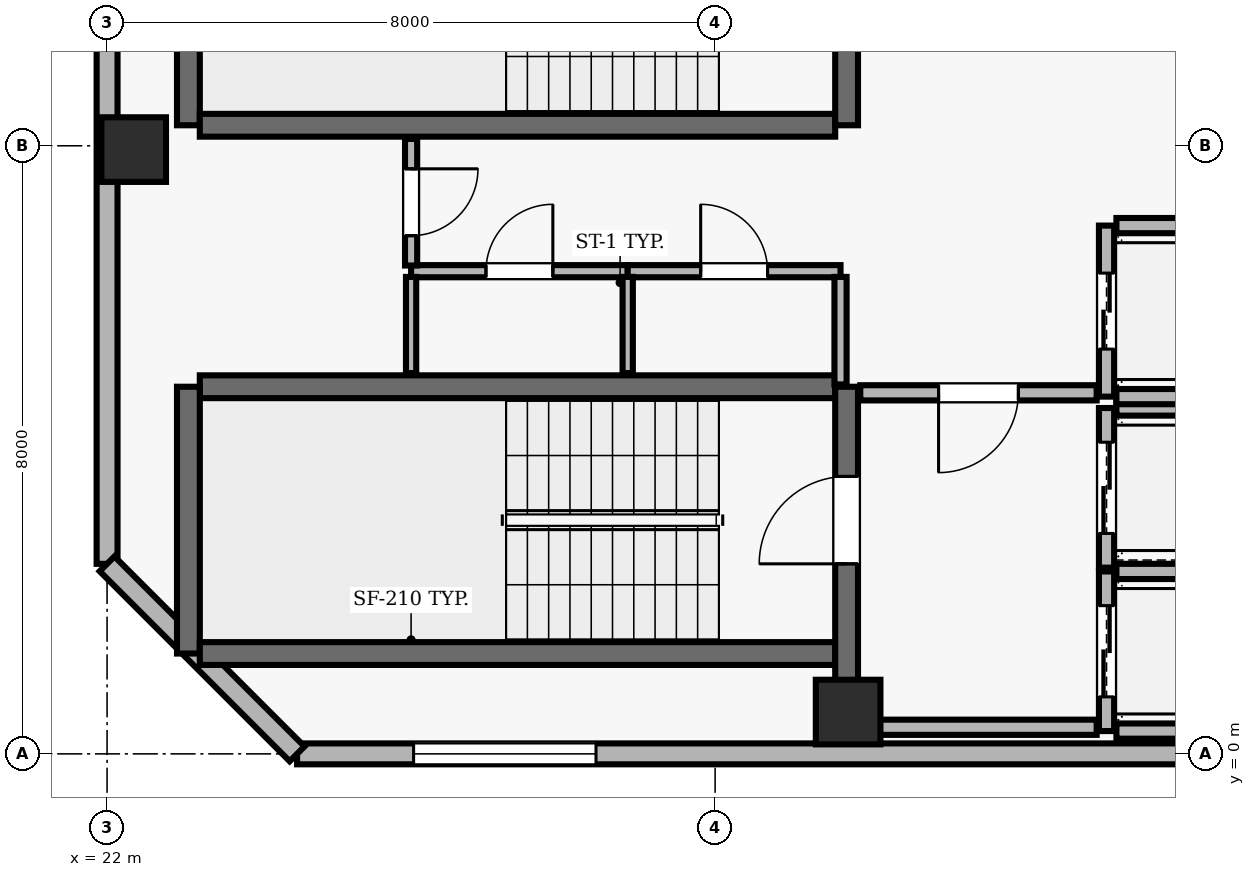
"""IFC4 building model, lengths in metres.
Left out: names, types, materials, properties, quantities, classifications, styles, units other than length and angle.
Written with IfcOpenShell. Run it as: python <this file> out.ifc"""

import sys

from ifc_helpers import new_model, si_unit, direction, frame, frame_2d, origin, origin_2d, place, context, subcontext, project, spatial, rectangle, extrude, element, fill, save


model = new_model("IFC4")
c1 = context("Model", 3, precision=1e-05, world=origin(), true_north=direction((0.0, 1.0)))
c2 = subcontext(c1, "Body", "Model", "MODEL_VIEW")
j1 = project(units=[si_unit("LENGTHUNIT", "METRE"), si_unit("PLANEANGLEUNIT", "RADIAN")], contexts=[c1])
p1 = place(None, origin())
s1 = spatial("IfcSite", under=j1, at=p1, CompositionType="ELEMENT")
p2 = place(p1, origin())
s2 = spatial("IfcBuilding", under=s1, at=p2, CompositionType="ELEMENT")
p3 = place(p2, frame((0.0, 0.0, 275.5)))
s3 = spatial("IfcBuildingStorey", under=s2, at=p3, CompositionType="ELEMENT", Elevation=275.5)
for number, where, z_axis, x_axis in (
    (1, (31.75, 0.55, 0.0), (0.0, 0.0, 1.0), (1.0, 0.0, 0.0)),
    (2, (22.35, 7.95, 0.0), (0.0, 0.0, 1.0), (1.0, 0.0, 0.0)),
):
    element("IfcColumn", number, at=place(p3, frame(where, z_axis=z_axis, x_axis=x_axis)), inside=s3, PredefinedType="COLUMN", context=c2, shape_type="SweptSolid", body=[
        extrude(rectangle(XDim=0.85, YDim=0.85, at=origin_2d()), origin(), (0.0, 0.0, 1.0), 3.9),
    ])
p4 = place(p3, frame((24.5, 0.0, 0.0), z_axis=(0.0, 0.0, 1.0), x_axis=(1.0, 0.0, 0.0)))
e3 = element("IfcWall", 3, at=p4, inside=s3, PredefinedType="SOLIDWALL", context=c2, shape_type="SweptSolid", body=[
    extrude(rectangle(XDim=32.8, YDim=0.275, at=frame_2d((16.4, 0.0))), origin(), (0.0, 0.0, 1.0), 3.69),
])
p5 = place(p4, frame((1.533, 0.0, 0.9)))
e4 = element("IfcOpeningElement", 4, at=p5, cuts=e3, PredefinedType="OPENING", context=c2, shape_type="SweptSolid", body=[
    extrude(rectangle(XDim=2.4, YDim=1.8, at=frame_2d((1.2, 0.9))), frame((0.0, 0.147, 0.0), z_axis=(0.0, -1.0, 0.0), x_axis=(1.0, 0.0, 0.0)), (0.0, 0.0, 1.0), 0.295),
])
p6 = place(p4, frame((23.85, 0.0, 0.9)))
e5 = element("IfcOpeningElement", 5, at=p6, cuts=e3, PredefinedType="OPENING", context=c2, shape_type="SweptSolid", body=[
    extrude(rectangle(XDim=2.4, YDim=1.8, at=frame_2d((1.2, 0.9))), frame((0.0, 0.147, 0.0), z_axis=(0.0, -1.0, 0.0), x_axis=(1.0, 0.0, 0.0)), (0.0, 0.0, 1.0), 0.295),
])
p7 = place(p4, frame((28.417, 0.0, 0.9)))
e6 = element("IfcOpeningElement", 6, at=p7, cuts=e3, PredefinedType="OPENING", context=c2, shape_type="SweptSolid", body=[
    extrude(rectangle(XDim=2.4, YDim=1.8, at=frame_2d((1.2, 0.9))), frame((0.0, 0.147, 0.0), z_axis=(0.0, -1.0, 0.0), x_axis=(1.0, 0.0, 0.0)), (0.0, 0.0, 1.0), 0.295),
])
p8 = place(p3, frame((22.0, 35.3, 0.0), z_axis=(0.0, 0.0, 1.0), x_axis=(0.0, -1.0, 0.0)))
e7 = element("IfcWall", 7, at=p8, inside=s3, PredefinedType="SOLIDWALL", context=c2, shape_type="SweptSolid", body=[
    extrude(rectangle(XDim=32.8, YDim=0.275, at=frame_2d((16.4, 0.0))), origin(), (0.0, 0.0, 1.0), 3.69),
])
p9 = place(p8, frame((7.3, 0.0, 0.0)))
e8 = element("IfcOpeningElement", 8, at=p9, cuts=e7, PredefinedType="OPENING", context=c2, shape_type="SweptSolid", body=[
    extrude(rectangle(XDim=1.0, YDim=2.2, at=frame_2d((0.5, 1.1))), frame((0.0, 0.147, 0.0), z_axis=(0.0, -1.0, 0.0), x_axis=(1.0, 0.0, 0.0)), (0.0, 0.0, 1.0), 0.295),
])
p10 = place(p8, frame((0.633, 0.0, 0.9)))
e9 = element("IfcOpeningElement", 9, at=p10, cuts=e7, PredefinedType="OPENING", context=c2, shape_type="SweptSolid", body=[
    extrude(rectangle(XDim=2.4, YDim=1.8, at=frame_2d((1.2, 0.9))), frame((0.0, 0.147, 0.0), z_axis=(0.0, -1.0, 0.0), x_axis=(1.0, 0.0, 0.0)), (0.0, 0.0, 1.0), 0.295),
])
p11 = place(p8, frame((12.917, 0.0, 0.9)))
e10 = element("IfcOpeningElement", 10, at=p11, cuts=e7, PredefinedType="OPENING", context=c2, shape_type="SweptSolid", body=[
    extrude(rectangle(XDim=2.4, YDim=1.8, at=frame_2d((1.2, 0.9))), frame((0.0, 0.147, 0.0), z_axis=(0.0, -1.0, 0.0), x_axis=(1.0, 0.0, 0.0)), (0.0, 0.0, 1.0), 0.295),
])
p12 = place(p8, frame((17.483, 0.0, 0.9)))
e11 = element("IfcOpeningElement", 11, at=p12, cuts=e7, PredefinedType="OPENING", context=c2, shape_type="SweptSolid", body=[
    extrude(rectangle(XDim=2.4, YDim=1.8, at=frame_2d((1.2, 0.9))), frame((0.0, 0.147, 0.0), z_axis=(0.0, -1.0, 0.0), x_axis=(1.0, 0.0, 0.0)), (0.0, 0.0, 1.0), 0.295),
])
p13 = place(p8, frame((23.4, 0.0, 0.9)))
e12 = element("IfcOpeningElement", 12, at=p13, cuts=e7, PredefinedType="OPENING", context=c2, shape_type="SweptSolid", body=[
    extrude(rectangle(XDim=2.4, YDim=1.8, at=frame_2d((1.2, 0.9))), frame((0.0, 0.147, 0.0), z_axis=(0.0, -1.0, 0.0), x_axis=(1.0, 0.0, 0.0)), (0.0, 0.0, 1.0), 0.295),
])
p14 = place(p3, frame((22.0, 2.5, 0.0), z_axis=(0.0, 0.0, 1.0), x_axis=(0.707106781187, -0.707106781187, 0.0)))
e13 = element("IfcWall", 13, at=p14, inside=s3, PredefinedType="SOLIDWALL", context=c2, shape_type="SweptSolid", body=[
    extrude(rectangle(XDim=3.536, YDim=0.275, at=frame_2d((1.768, 0.0))), origin(), (0.0, 0.0, 1.0), 3.69),
])
p15 = place(p3, frame((31.58, 4.83, 0.0), z_axis=(0.0, 0.0, 1.0), x_axis=(-1.0, 0.0, 0.0)))
e14 = element("IfcWall", 14, at=p15, inside=s3, PredefinedType="SHEAR", context=c2, shape_type="SweptSolid", body=[
    extrude(rectangle(XDim=8.36, YDim=0.3, at=frame_2d((4.18, 0.0))), origin(), (0.0, 0.0, 1.0), 3.69),
])
p16 = place(p3, frame((23.07, 4.83, 0.0), z_axis=(0.0, 0.0, 1.0), x_axis=(0.0, -1.0, 0.0)))
e15 = element("IfcWall", 15, at=p16, inside=s3, PredefinedType="SHEAR", context=c2, shape_type="SweptSolid", body=[
    extrude(rectangle(XDim=3.51, YDim=0.3, at=frame_2d((1.755, 0.0))), origin(), (0.0, 0.0, 1.0), 3.69),
])
p17 = place(p3, frame((23.22, 1.32, 0.0), z_axis=(0.0, 0.0, 1.0), x_axis=(1.0, 0.0, 0.0)))
e16 = element("IfcWall", 16, at=p17, inside=s3, PredefinedType="SHEAR", context=c2, shape_type="SweptSolid", body=[
    extrude(rectangle(XDim=8.36, YDim=0.3, at=frame_2d((4.18, 0.0))), origin(), (0.0, 0.0, 1.0), 3.69),
])
p18 = place(p3, frame((31.73, 0.96, 0.0), z_axis=(0.0, 0.0, 1.0), x_axis=(0.0, 1.0, 0.0)))
e17 = element("IfcWall", 17, at=p18, inside=s3, PredefinedType="SHEAR", context=c2, shape_type="SweptSolid", body=[
    extrude(rectangle(XDim=3.87, YDim=0.3, at=frame_2d((1.935, 0.0))), origin(), (0.0, 0.0, 1.0), 3.69),
])
p19 = place(p18, frame((1.54, 0.0, 0.0)))
e18 = element("IfcOpeningElement", 18, at=p19, cuts=e17, PredefinedType="OPENING", context=c2, shape_type="SweptSolid", body=[
    extrude(rectangle(XDim=1.15, YDim=2.15, at=frame_2d((0.575, 1.075))), frame((0.0, 0.16, 0.0), z_axis=(0.0, -1.0, 0.0), x_axis=(1.0, 0.0, 0.0)), (0.0, 0.0, 1.0), 0.32),
])
p20 = place(p3, frame((23.07, 11.78, 0.0), z_axis=(0.0, 0.0, 1.0), x_axis=(0.0, -1.0, 0.0)))
e19 = element("IfcWall", 19, at=p20, inside=s3, PredefinedType="SHEAR", context=c2, shape_type="SweptSolid", body=[
    extrude(rectangle(XDim=3.51, YDim=0.3, at=frame_2d((1.755, 0.0))), origin(), (0.0, 0.0, 1.0), 3.69),
])
p21 = place(p3, frame((23.22, 8.27, 0.0), z_axis=(0.0, 0.0, 1.0), x_axis=(1.0, 0.0, 0.0)))
e20 = element("IfcWall", 20, at=p21, inside=s3, PredefinedType="SHEAR", context=c2, shape_type="SweptSolid", body=[
    extrude(rectangle(XDim=8.36, YDim=0.3, at=frame_2d((4.18, 0.0))), origin(), (0.0, 0.0, 1.0), 3.69),
])
p22 = place(p3, frame((31.73, 8.27, 0.0), z_axis=(0.0, 0.0, 1.0), x_axis=(0.0, 1.0, 0.0)))
e21 = element("IfcWall", 21, at=p22, inside=s3, PredefinedType="SHEAR", context=c2, shape_type="SweptSolid", body=[
    extrude(rectangle(XDim=3.51, YDim=0.3, at=frame_2d((1.755, 0.0))), origin(), (0.0, 0.0, 1.0), 3.69),
])
p23 = place(p22, frame((1.18, 0.0, 0.0)))
e22 = element("IfcOpeningElement", 22, at=p23, cuts=e21, PredefinedType="OPENING", context=c2, shape_type="SweptSolid", body=[
    extrude(rectangle(XDim=1.15, YDim=2.15, at=frame_2d((0.575, 1.075))), frame((0.0, 0.16, 0.0), z_axis=(0.0, -1.0, 0.0), x_axis=(1.0, 0.0, 0.0)), (0.0, 0.0, 1.0), 0.32),
])
p24 = place(p3, frame((35.15, 2.4, 0.0), z_axis=(0.0, 0.0, 1.0), x_axis=(0.0, -1.0, 0.0)))
e23 = element("IfcWall", 23, at=p24, inside=s3, PredefinedType="SOLIDWALL", context=c2, shape_type="SweptSolid", body=[
    extrude(rectangle(XDim=2.1, YDim=0.2, at=frame_2d((1.05, 0.0))), origin(), (0.0, 0.0, 1.0), 3.69),
])
p25 = place(p24, frame((0.45, 0.0, 0.0)))
e24 = element("IfcOpeningElement", 24, at=p25, cuts=e23, PredefinedType="OPENING", context=c2, shape_type="SweptSolid", body=[
    extrude(rectangle(XDim=1.2, YDim=2.15, at=frame_2d((0.6, 1.075))), frame((0.0, 0.11, 0.0), z_axis=(0.0, -1.0, 0.0), x_axis=(1.0, 0.0, 0.0)), (0.0, 0.0, 1.0), 0.22),
])
for number, where, z_axis, x_axis in (
    (25, (35.28, 0.3, 0.0), (0.0, 0.0, 1.0), (1.0, 0.0, 0.0)),
    (26, (37.42, 2.4, 0.0), (0.0, 0.0, 1.0), (-1.0, 0.0, 0.0)),
):
    element("IfcWall", number, at=place(p3, frame(where, z_axis=z_axis, x_axis=x_axis)), inside=s3, PredefinedType="SOLIDWALL", context=c2, shape_type="SweptSolid", body=[
        extrude(rectangle(XDim=2.14, YDim=0.2, at=frame_2d((1.07, 0.0))), origin(), (0.0, 0.0, 1.0), 3.69),
    ])
p26 = place(p3, frame((35.15, 4.55, 0.0), z_axis=(0.0, 0.0, 1.0), x_axis=(0.0, -1.0, 0.0)))
e27 = element("IfcWall", 27, at=p26, inside=s3, PredefinedType="SOLIDWALL", context=c2, shape_type="SweptSolid", body=[
    extrude(rectangle(XDim=2.1, YDim=0.2, at=frame_2d((1.05, 0.0))), origin(), (0.0, 0.0, 1.0), 3.69),
])
p27 = place(p26, frame((0.45, 0.0, 0.0)))
e28 = element("IfcOpeningElement", 28, at=p27, cuts=e27, PredefinedType="OPENING", context=c2, shape_type="SweptSolid", body=[
    extrude(rectangle(XDim=1.2, YDim=2.15, at=frame_2d((0.6, 1.075))), frame((0.0, 0.11, 0.0), z_axis=(0.0, -1.0, 0.0), x_axis=(1.0, 0.0, 0.0)), (0.0, 0.0, 1.0), 0.22),
])
p28 = place(p3, frame((37.42, 4.55, 0.0), z_axis=(0.0, 0.0, 1.0), x_axis=(-1.0, 0.0, 0.0)))
e29 = element("IfcWall", 29, at=p28, inside=s3, PredefinedType="SOLIDWALL", context=c2, shape_type="SweptSolid", body=[
    extrude(rectangle(XDim=2.14, YDim=0.2, at=frame_2d((1.07, 0.0))), origin(), (0.0, 0.0, 1.0), 3.69),
])
p29 = place(p3, frame((35.15, 6.95, 0.0), z_axis=(0.0, 0.0, 1.0), x_axis=(0.0, -1.0, 0.0)))
e30 = element("IfcWall", 30, at=p29, inside=s3, PredefinedType="SOLIDWALL", context=c2, shape_type="SweptSolid", body=[
    extrude(rectangle(XDim=2.25, YDim=0.2, at=frame_2d((1.125, 0.0))), origin(), (0.0, 0.0, 1.0), 3.69),
])
p30 = place(p29, frame((0.625, 0.0, 0.0)))
e31 = element("IfcOpeningElement", 31, at=p30, cuts=e30, PredefinedType="OPENING", context=c2, shape_type="SweptSolid", body=[
    extrude(rectangle(XDim=1.0, YDim=2.1, at=frame_2d((0.5, 1.05))), frame((0.0, 0.11, 0.0), z_axis=(0.0, -1.0, 0.0), x_axis=(1.0, 0.0, 0.0)), (0.0, 0.0, 1.0), 0.22),
])
for number, where, z_axis, x_axis in (
    (32, (35.28, 4.7, 0.0), (0.0, 0.0, 1.0), (1.0, 0.0, 0.0)),
    (33, (37.42, 6.95, 0.0), (0.0, 0.0, 1.0), (-1.0, 0.0, 0.0)),
):
    element("IfcWall", number, at=place(p3, frame(where, z_axis=z_axis, x_axis=x_axis)), inside=s3, PredefinedType="SOLIDWALL", context=c2, shape_type="SweptSolid", body=[
        extrude(rectangle(XDim=2.14, YDim=0.2, at=frame_2d((1.07, 0.0))), origin(), (0.0, 0.0, 1.0), 3.69),
    ])
p31 = place(p3, frame((26.0, 6.35, 0.0), z_axis=(0.0, 0.0, 1.0), x_axis=(1.0, 0.0, 0.0)))
e34 = element("IfcWall", 34, at=p31, inside=s3, PredefinedType="PARTITIONING", context=c2, shape_type="SweptSolid", body=[
    extrude(rectangle(XDim=2.85, YDim=0.16, at=frame_2d((1.425, 0.0))), origin(), (0.0, 0.0, 1.0), 3.69),
])
p32 = place(p31, frame((0.985, 0.0, 0.0)))
e35 = element("IfcOpeningElement", 35, at=p32, cuts=e34, PredefinedType="OPENING", context=c2, shape_type="SweptSolid", body=[
    extrude(rectangle(XDim=0.88, YDim=2.1, at=frame_2d((0.44, 1.05))), frame((0.0, 0.09, 0.0), z_axis=(0.0, -1.0, 0.0), x_axis=(1.0, 0.0, 0.0)), (0.0, 0.0, 1.0), 0.18),
])
p33 = place(p3, frame((28.85, 6.35, 0.0), z_axis=(0.0, 0.0, 1.0), x_axis=(1.0, 0.0, 0.0)))
e36 = element("IfcWall", 36, at=p33, inside=s3, PredefinedType="PARTITIONING", context=c2, shape_type="SweptSolid", body=[
    extrude(rectangle(XDim=2.8, YDim=0.16, at=frame_2d((1.4, 0.0))), origin(), (0.0, 0.0, 1.0), 3.69),
])
p34 = place(p33, frame((0.96, 0.0, 0.0)))
e37 = element("IfcOpeningElement", 37, at=p34, cuts=e36, PredefinedType="OPENING", context=c2, shape_type="SweptSolid", body=[
    extrude(rectangle(XDim=0.88, YDim=2.1, at=frame_2d((0.44, 1.05))), frame((0.0, 0.09, 0.0), z_axis=(0.0, -1.0, 0.0), x_axis=(1.0, 0.0, 0.0)), (0.0, 0.0, 1.0), 0.18),
])
p35 = place(p3, frame((31.65, 0.35, 0.0), z_axis=(0.0, 0.0, 1.0), x_axis=(1.0, 0.0, 0.0)))
e38 = element("IfcWall", 38, at=p35, inside=s3, PredefinedType="SOLIDWALL", context=c2, shape_type="SweptSolid", body=[
    extrude(rectangle(XDim=3.37, YDim=0.2, at=frame_2d((1.685, 0.0))), origin(), (0.0, 0.0, 1.0), 3.69),
])
p36 = place(p3, frame((35.02, 4.75, 0.0), z_axis=(0.0, 0.0, 1.0), x_axis=(-1.0, 0.0, 0.0)))
e39 = element("IfcWall", 39, at=p36, inside=s3, PredefinedType="SOLIDWALL", context=c2, shape_type="SweptSolid", body=[
    extrude(rectangle(XDim=3.11, YDim=0.2, at=frame_2d((1.555, 0.0))), origin(), (0.0, 0.0, 1.0), 3.69),
])
p37 = place(p36, frame((1.03, 0.0, 0.0)))
e40 = element("IfcOpeningElement", 40, at=p37, cuts=e39, PredefinedType="OPENING", context=c2, shape_type="SweptSolid", body=[
    extrude(rectangle(XDim=1.05, YDim=2.15, at=frame_2d((0.525, 1.075))), frame((0.0, 0.11, 0.0), z_axis=(0.0, -1.0, 0.0), x_axis=(1.0, 0.0, 0.0)), (0.0, 0.0, 1.0), 0.22),
])
p38 = place(p3, frame((26.0, 5.01, 0.0), z_axis=(0.0, 0.0, 1.0), x_axis=(0.0, 1.0, 0.0)))
e41 = element("IfcWall", 41, at=p38, inside=s3, PredefinedType="PARTITIONING", context=c2, shape_type="SweptSolid", body=[
    extrude(rectangle(XDim=1.265, YDim=0.135, at=frame_2d((0.632, 0.0))), origin(), (0.0, 0.0, 1.0), 3.69),
])
p39 = place(p3, frame((26.0, 8.09, 0.0), z_axis=(0.0, 0.0, 1.0), x_axis=(0.0, -1.0, 0.0)))
e42 = element("IfcWall", 42, at=p39, inside=s3, PredefinedType="PARTITIONING", context=c2, shape_type="SweptSolid", body=[
    extrude(rectangle(XDim=1.665, YDim=0.16, at=frame_2d((0.833, 0.0))), origin(), (0.0, 0.0, 1.0), 3.69),
])
p40 = place(p39, frame((0.393, 0.0, 0.0)))
e43 = element("IfcOpeningElement", 43, at=p40, cuts=e42, PredefinedType="OPENING", context=c2, shape_type="SweptSolid", body=[
    extrude(rectangle(XDim=0.88, YDim=2.1, at=frame_2d((0.44, 1.05))), frame((0.0, 0.09, 0.0), z_axis=(0.0, -1.0, 0.0), x_axis=(1.0, 0.0, 0.0)), (0.0, 0.0, 1.0), 0.18),
])
p41 = place(p3, frame((28.85, 5.01, 0.0), z_axis=(0.0, 0.0, 1.0), x_axis=(0.0, 1.0, 0.0)))
e44 = element("IfcWall", 44, at=p41, inside=s3, PredefinedType="PARTITIONING", context=c2, shape_type="SweptSolid", body=[
    extrude(rectangle(XDim=1.265, YDim=0.135, at=frame_2d((0.632, 0.0))), origin(), (0.0, 0.0, 1.0), 3.69),
])
p42 = place(p3, frame((31.65, 4.86, 0.0), z_axis=(0.0, 0.0, 1.0), x_axis=(0.0, 1.0, 0.0)))
e45 = element("IfcWall", 45, at=p42, inside=s3, PredefinedType="PARTITIONING", context=c2, shape_type="SweptSolid", body=[
    extrude(rectangle(XDim=1.415, YDim=0.16, at=frame_2d((0.708, 0.0))), origin(), (0.0, 0.0, 1.0), 3.69),
])
p43 = place(p5, origin())
e46 = element("IfcWindow", 46, at=p43, inside=s3, PartitioningType="SINGLE_PANEL", PredefinedType="WINDOW", context=c2, shape_type="SweptSolid", body=[
    extrude(rectangle(XDim=2.4, YDim=1.8, at=frame_2d((1.2, 0.9))), frame((0.0, 0.03, 0.0), z_axis=(0.0, -1.0, 0.0), x_axis=(1.0, 0.0, 0.0)), (0.0, 0.0, 1.0), 0.06),
])
fill(e4, e46)
p44 = place(p19, origin())
e47 = element("IfcDoor", 47, at=p44, inside=s3, OperationType="SINGLE_SWING_LEFT", PredefinedType="DOOR", context=c2, shape_type="SweptSolid", body=[
    extrude(rectangle(XDim=1.15, YDim=2.15, at=frame_2d((0.575, 1.075))), frame((0.0, 0.025, 0.0), z_axis=(0.0, -1.0, 0.0), x_axis=(1.0, 0.0, 0.0)), (0.0, 0.0, 1.0), 0.05),
])
fill(e18, e47)
p45 = place(p25, origin())
e48 = element("IfcDoor", 48, at=p45, inside=s3, OperationType="DOUBLE_DOOR_SLIDING", PredefinedType="DOOR", context=c2, shape_type="SweptSolid", body=[
    extrude(rectangle(XDim=1.2, YDim=2.15, at=frame_2d((0.6, 1.075))), frame((0.0, 0.025, 0.0), z_axis=(0.0, -1.0, 0.0), x_axis=(1.0, 0.0, 0.0)), (0.0, 0.0, 1.0), 0.05),
])
fill(e24, e48)
p46 = place(p27, origin())
e49 = element("IfcDoor", 49, at=p46, inside=s3, OperationType="DOUBLE_DOOR_SLIDING", PredefinedType="DOOR", context=c2, shape_type="SweptSolid", body=[
    extrude(rectangle(XDim=1.2, YDim=2.15, at=frame_2d((0.6, 1.075))), frame((0.0, 0.025, 0.0), z_axis=(0.0, -1.0, 0.0), x_axis=(1.0, 0.0, 0.0)), (0.0, 0.0, 1.0), 0.05),
])
fill(e28, e49)
p47 = place(p30, origin())
e50 = element("IfcDoor", 50, at=p47, inside=s3, OperationType="DOUBLE_DOOR_SLIDING", PredefinedType="DOOR", context=c2, shape_type="SweptSolid", body=[
    extrude(rectangle(XDim=1.0, YDim=2.1, at=frame_2d((0.5, 1.05))), frame((0.0, 0.025, 0.0), z_axis=(0.0, -1.0, 0.0), x_axis=(1.0, 0.0, 0.0)), (0.0, 0.0, 1.0), 0.05),
])
fill(e31, e50)
p48 = place(p37, origin())
e51 = element("IfcDoor", 51, at=p48, inside=s3, OperationType="SINGLE_SWING_RIGHT", PredefinedType="DOOR", context=c2, shape_type="SweptSolid", body=[
    extrude(rectangle(XDim=1.05, YDim=2.15, at=frame_2d((0.525, 1.075))), frame((0.0, 0.025, 0.0), z_axis=(0.0, -1.0, 0.0), x_axis=(1.0, 0.0, 0.0)), (0.0, 0.0, 1.0), 0.05),
])
fill(e40, e51)
p49 = place(p40, origin())
e52 = element("IfcDoor", 52, at=p49, inside=s3, OperationType="SINGLE_SWING_LEFT", PredefinedType="DOOR", context=c2, shape_type="SweptSolid", body=[
    extrude(rectangle(XDim=0.88, YDim=2.1, at=frame_2d((0.44, 1.05))), frame((0.0, 0.025, 0.0), z_axis=(0.0, -1.0, 0.0), x_axis=(1.0, 0.0, 0.0)), (0.0, 0.0, 1.0), 0.05),
])
fill(e43, e52)
p50 = place(p32, origin())
e53 = element("IfcDoor", 53, at=p50, inside=s3, OperationType="SINGLE_SWING_RIGHT", PredefinedType="DOOR", context=c2, shape_type="SweptSolid", body=[
    extrude(rectangle(XDim=0.88, YDim=2.1, at=frame_2d((0.44, 1.05))), frame((0.0, 0.025, 0.0), z_axis=(0.0, -1.0, 0.0), x_axis=(1.0, 0.0, 0.0)), (0.0, 0.0, 1.0), 0.05),
])
fill(e35, e53)
p51 = place(p34, origin())
e54 = element("IfcDoor", 54, at=p51, inside=s3, OperationType="SINGLE_SWING_LEFT", PredefinedType="DOOR", context=c2, shape_type="SweptSolid", body=[
    extrude(rectangle(XDim=0.88, YDim=2.1, at=frame_2d((0.44, 1.05))), frame((0.0, 0.025, 0.0), z_axis=(0.0, -1.0, 0.0), x_axis=(1.0, 0.0, 0.0)), (0.0, 0.0, 1.0), 0.05),
])
fill(e37, e54)
save(model, sys.argv[1])
